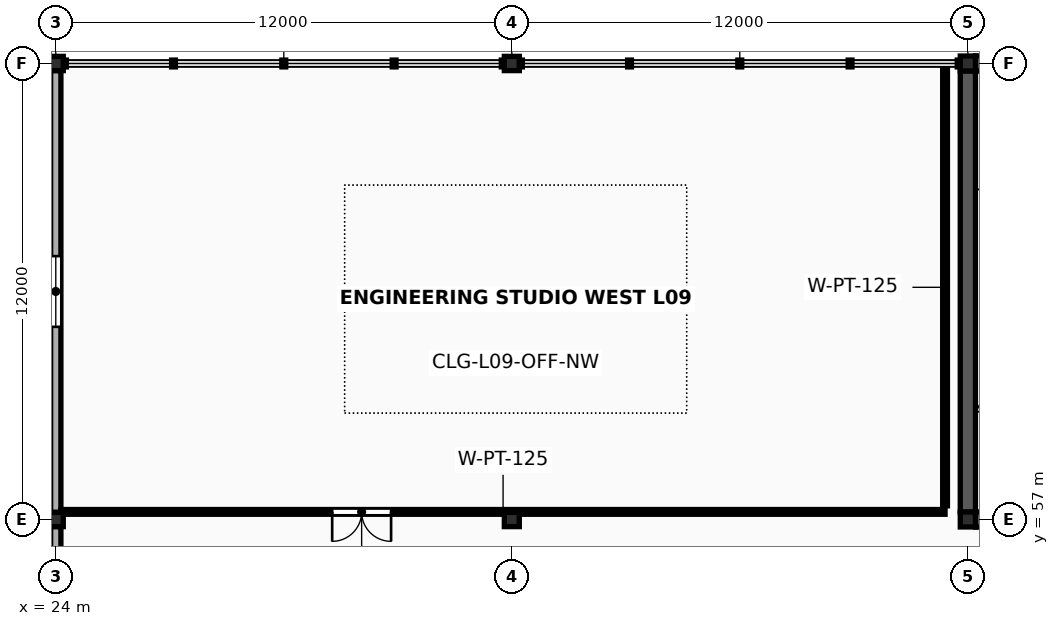
"""IFC4 building model, lengths in metres.
Left out: names, types, materials, properties, quantities, classifications, styles, units other than length and angle.
Written with IfcOpenShell. Run it as: python <this file> out.ifc"""

import sys

from ifc_helpers import new_model, si_unit, direction, frame, frame_2d, origin, origin_2d, place, context, subcontext, project, spatial, rectangle, i_section, extrude, element, fill, save


model = new_model("IFC4")
c1 = context("Model", 3, precision=1e-05, world=origin(), true_north=direction((0.0, 1.0)))
c2 = subcontext(c1, "Body", "Model", "MODEL_VIEW")
j1 = project(units=[si_unit("LENGTHUNIT", "METRE"), si_unit("PLANEANGLEUNIT", "RADIAN")], contexts=[c1])
p1 = place(None, origin())
s1 = spatial("IfcSite", under=j1, at=p1, CompositionType="ELEMENT")
p2 = place(p1, origin())
s2 = spatial("IfcBuilding", under=s1, at=p2, CompositionType="ELEMENT")
p3 = place(p2, frame((0.0, 0.0, 37.6)))
s3 = spatial("IfcBuildingStorey", under=s2, at=p3, CompositionType="ELEMENT", Elevation=37.6)
for number, where, z_axis, x_axis in (
    (1, (24.0, 57.0, 0.0), (0.0, 0.0, 1.0), (1.0, 0.0, 0.0)),
    (2, (24.0, 69.0, 0.0), (0.0, 0.0, 1.0), (1.0, 0.0, 0.0)),
    (3, (36.0, 57.0, 0.0), (0.0, 0.0, 1.0), (1.0, 0.0, 0.0)),
    (4, (36.0, 69.0, 0.0), (0.0, 0.0, 1.0), (1.0, 0.0, 0.0)),
):
    element("IfcColumn", number, at=place(p3, frame(where, z_axis=z_axis, x_axis=x_axis)), inside=s3, PredefinedType="COLUMN", context=c2, shape_type="SweptSolid", body=[
        extrude(i_section(OverallWidth=0.394, OverallDepth=0.375, WebThickness=0.017, FlangeThickness=0.028, FilletRadius=0.018, at=origin_2d()), origin(), (0.0, 0.0, 1.0), 4.0),
    ])
for number, where, z_axis, x_axis in (
    (5, (48.0, 57.0, 0.0), (0.0, 0.0, 1.0), (1.0, 0.0, 0.0)),
    (6, (48.0, 69.0, 0.0), (0.0, 0.0, 1.0), (1.0, 0.0, 0.0)),
):
    element("IfcColumn", number, at=place(p3, frame(where, z_axis=z_axis, x_axis=x_axis)), inside=s3, PredefinedType="COLUMN", context=c2, shape_type="SweptSolid", body=[
        extrude(i_section(OverallWidth=0.399, OverallDepth=0.393, WebThickness=0.023, FlangeThickness=0.037, FilletRadius=0.018, at=origin_2d()), origin(), (0.0, 0.0, 1.0), 4.0),
    ])
p4 = place(p3, frame((48.197, 57.0, 0.0), z_axis=(0.0, 0.0, 1.0), x_axis=(1.0, 0.0, 0.0)))
e7 = element("IfcWall", 7, at=p4, inside=s3, PredefinedType="SHEAR", context=c2, shape_type="SweptSolid", body=[
    extrude(rectangle(XDim=11.607, YDim=0.4, at=frame_2d((5.803, 0.0))), origin(), (0.0, 0.0, 1.0), 3.838),
])
p5 = place(p4, frame((5.004, 0.0, 0.0)))
e8 = element("IfcOpeningElement", 8, at=p5, cuts=e7, PredefinedType="OPENING", context=c2, shape_type="SweptSolid", body=[
    extrude(rectangle(XDim=1.2, YDim=2.2, at=frame_2d((0.6, 1.1))), frame((0.0, 0.215, 0.0), z_axis=(0.0, -1.0, 0.0), x_axis=(1.0, 0.0, 0.0)), (0.0, 0.0, 1.0), 0.43),
])
p6 = place(p4, frame((8.703, 0.0, 0.0)))
e9 = element("IfcOpeningElement", 9, at=p6, cuts=e7, PredefinedType="OPENING", context=c2, shape_type="SweptSolid", body=[
    extrude(rectangle(XDim=1.5, YDim=2.25, at=frame_2d((0.75, 1.125))), frame((0.0, 0.215, 0.0), z_axis=(0.0, -1.0, 0.0), x_axis=(1.0, 0.0, 0.0)), (0.0, 0.0, 1.0), 0.43),
])
p7 = place(p3, frame((48.197, 69.0, 0.0), z_axis=(0.0, 0.0, 1.0), x_axis=(1.0, 0.0, 0.0)))
e10 = element("IfcWall", 10, at=p7, inside=s3, PredefinedType="SHEAR", context=c2, shape_type="SweptSolid", body=[
    extrude(rectangle(XDim=11.607, YDim=0.4, at=frame_2d((5.803, 0.0))), origin(), (0.0, 0.0, 1.0), 3.838),
])
p8 = place(p3, frame((48.0, 57.194, 0.0), z_axis=(0.0, 0.0, 1.0), x_axis=(0.0, 1.0, 0.0)))
e11 = element("IfcWall", 11, at=p8, inside=s3, PredefinedType="SHEAR", context=c2, shape_type="SweptSolid", body=[
    extrude(rectangle(XDim=11.613, YDim=0.4, at=frame_2d((5.806, 0.0))), origin(), (0.0, 0.0, 1.0), 3.838),
])
p9 = place(p3, frame((24.0, 45.186, 0.0), z_axis=(0.0, 0.0, 1.0), x_axis=(0.0, 1.0, 0.0)))
e12 = element("IfcWall", 12, at=p9, inside=s3, PredefinedType="SOLIDWALL", context=c2, shape_type="SweptSolid", body=[
    extrude(rectangle(XDim=11.629, YDim=0.27, at=frame_2d((5.814, 0.0))), origin(), (0.0, 0.0, 1.0), 3.291),
])
p10 = place(p9, frame((4.994, 0.0, 0.78)))
e13 = element("IfcOpeningElement", 13, at=p10, cuts=e12, PredefinedType="OPENING", context=c2, shape_type="SweptSolid", body=[
    extrude(rectangle(XDim=1.64, YDim=1.74, at=frame_2d((0.82, 0.87))), frame((0.0, 0.15, 0.0), z_axis=(0.0, -1.0, 0.0), x_axis=(1.0, 0.0, 0.0)), (0.0, 0.0, 1.0), 0.3),
])
p11 = place(p3, frame((24.0, 57.186, 0.0), z_axis=(0.0, 0.0, 1.0), x_axis=(0.0, 1.0, 0.0)))
e14 = element("IfcWall", 14, at=p11, inside=s3, PredefinedType="SOLIDWALL", context=c2, shape_type="SweptSolid", body=[
    extrude(rectangle(XDim=11.629, YDim=0.27, at=frame_2d((5.814, 0.0))), origin(), (0.0, 0.0, 1.0), 3.291),
])
p12 = place(p11, frame((4.885, 0.0, 0.78)))
e15 = element("IfcOpeningElement", 15, at=p12, cuts=e14, PredefinedType="OPENING", context=c2, shape_type="SweptSolid", body=[
    extrude(rectangle(XDim=1.86, YDim=1.74, at=frame_2d((0.93, 0.87))), frame((0.0, 0.15, 0.0), z_axis=(0.0, -1.0, 0.0), x_axis=(1.0, 0.0, 0.0)), (0.0, 0.0, 1.0), 0.3),
])
p13 = place(p3, frame((24.14, 57.2, 0.0), z_axis=(0.0, 0.0, 1.0), x_axis=(1.0, 0.0, 0.0)))
e16 = element("IfcWall", 16, at=p13, inside=s3, PredefinedType="PARTITIONING", context=c2, shape_type="SweptSolid", body=[
    extrude(rectangle(XDim=23.26, YDim=0.125, at=frame_2d((11.63, 0.0))), origin(), (0.0, 0.0, 1.0), 2.88),
])
p14 = place(p13, frame((7.133, 0.0, 0.0)))
e17 = element("IfcOpeningElement", 17, at=p14, cuts=e16, PredefinedType="OPENING", context=c2, shape_type="SweptSolid", body=[
    extrude(rectangle(XDim=1.55, YDim=2.31, at=frame_2d((0.775, 1.155))), frame((0.0, 0.077, 0.0), z_axis=(0.0, -1.0, 0.0), x_axis=(1.0, 0.0, 0.0)), (0.0, 0.0, 1.0), 0.155),
])
p15 = place(p3, frame((47.4, 57.36, 0.0), z_axis=(0.0, 0.0, 1.0), x_axis=(0.0, 1.0, 0.0)))
e18 = element("IfcWall", 18, at=p15, inside=s3, PredefinedType="PARTITIONING", context=c2, shape_type="SweptSolid", body=[
    extrude(rectangle(XDim=11.5, YDim=0.125, at=frame_2d((5.75, 0.0))), origin(), (0.0, 0.0, 1.0), 2.88),
])
p16 = place(p12, origin())
e19 = element("IfcWindow", 19, at=p16, inside=s3, PartitioningType="DOUBLE_PANEL_VERTICAL", PredefinedType="WINDOW", context=c2, shape_type="SweptSolid", body=[
    extrude(rectangle(XDim=1.86, YDim=1.74, at=frame_2d((0.93, 0.87))), frame((0.0, 0.03, 0.0), z_axis=(0.0, -1.0, 0.0), x_axis=(1.0, 0.0, 0.0)), (0.0, 0.0, 1.0), 0.06),
])
fill(e15, e19)
p17 = place(p14, origin())
e20 = element("IfcDoor", 20, at=p17, inside=s3, OperationType="DOUBLE_DOOR_SINGLE_SWING", PredefinedType="DOOR", context=c2, shape_type="SweptSolid", body=[
    extrude(rectangle(XDim=1.55, YDim=2.31, at=frame_2d((0.775, 1.155))), frame((0.0, 0.025, 0.0), z_axis=(0.0, -1.0, 0.0), x_axis=(1.0, 0.0, 0.0)), (0.0, 0.0, 1.0), 0.05),
])
fill(e17, e20)
save(model, sys.argv[1])
